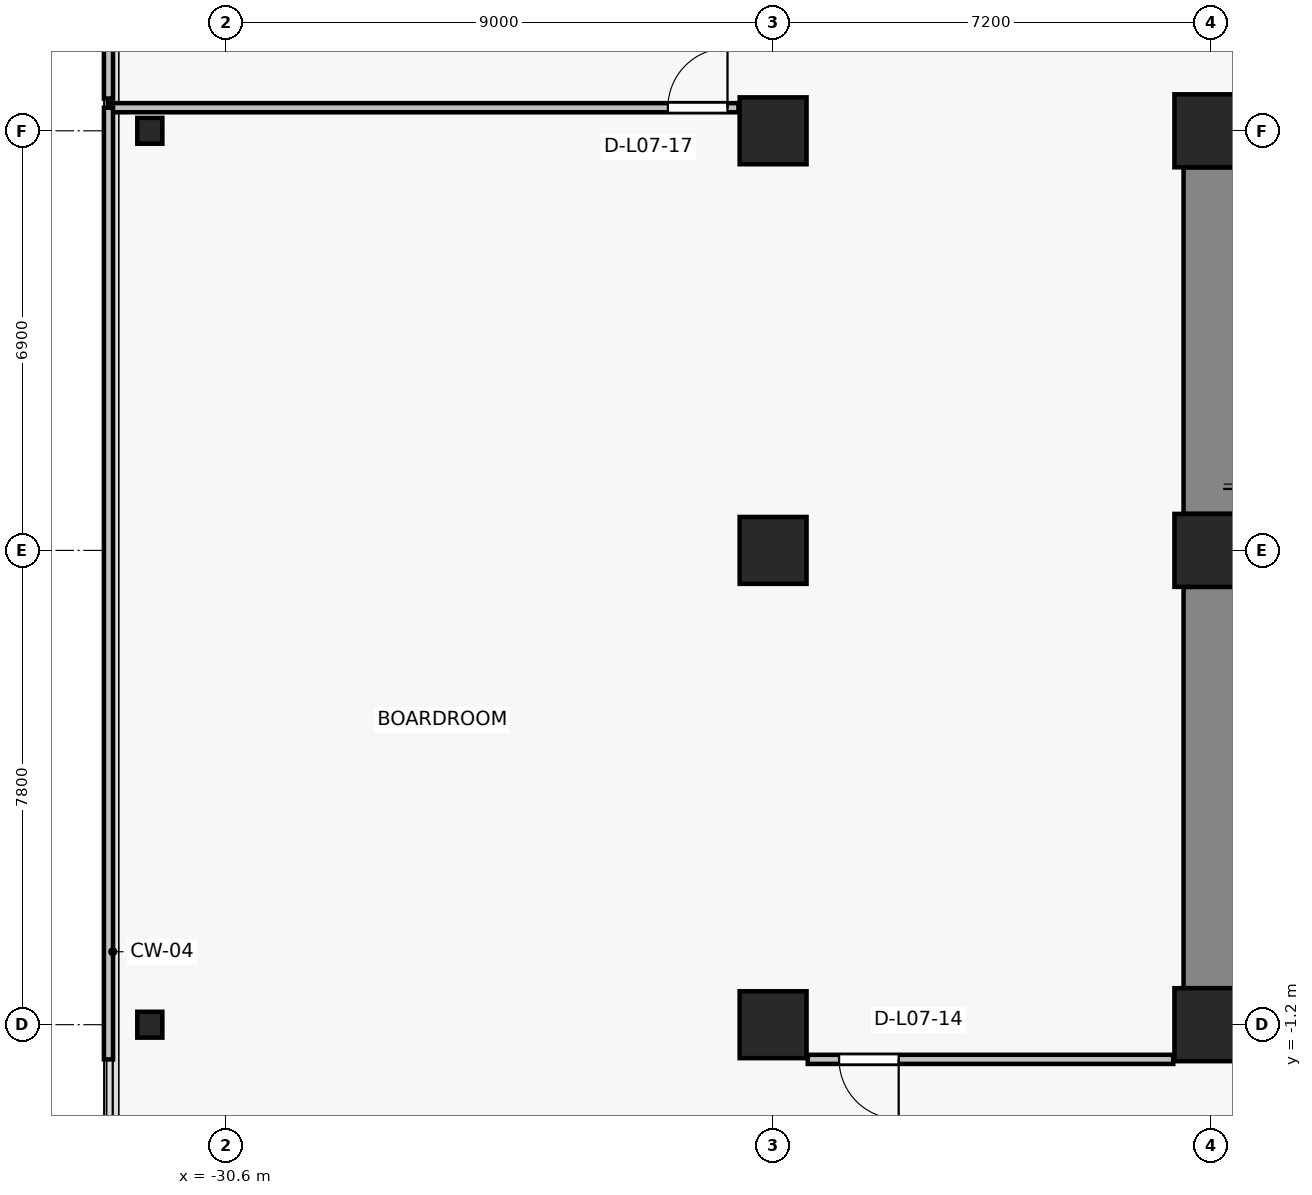
"""IFC4 building model, lengths in metres.
Left out: names, types, materials, properties, quantities, classifications, styles, units other than length and angle.
Written with IfcOpenShell. Run it as: python <this file> out.ifc"""

import sys

from ifc_helpers import new_model, si_unit, direction, frame, frame_2d, origin, origin_2d, place, context, subcontext, project, spatial, rectangle, i_section, extrude, source, transform, mapped, element, fill, save


model = new_model("IFC4")
c1 = context("Model", 3, precision=1e-05, world=origin(), true_north=direction((0.0, 1.0)))
c2 = subcontext(c1, "Body", "Model", "MODEL_VIEW")
j1 = project(units=[si_unit("LENGTHUNIT", "METRE"), si_unit("PLANEANGLEUNIT", "RADIAN")], contexts=[c1])
p1 = place(None, origin())
s1 = spatial("IfcSite", under=j1, at=p1, CompositionType="ELEMENT")
p2 = place(p1, origin())
s2 = spatial("IfcBuilding", under=s1, at=p2, CompositionType="ELEMENT")
p3 = place(p2, frame((0.0, 0.0, 30.7)))
s3 = spatial("IfcBuildingStorey", under=s2, at=p3, CompositionType="ELEMENT", Elevation=30.7)
for number, where, z_axis, x_axis in (
    (1, (-14.4, -1.2, 0.0), (0.0, 0.0, 1.0), (1.0, 0.0, 0.0)),
    (2, (-14.4, 6.6, 0.0), (0.0, 0.0, 1.0), (1.0, 0.0, 0.0)),
    (3, (-14.4, 13.5, 0.0), (0.0, 0.0, 1.0), (1.0, 0.0, 0.0)),
):
    element("IfcColumn", number, at=place(p3, frame(where, z_axis=z_axis, x_axis=x_axis)), inside=s3, PredefinedType="COLUMN", context=c2, shape_type="SweptSolid", body=[
        extrude(rectangle(XDim=1.2, YDim=1.2, at=origin_2d()), origin(), (0.0, 0.0, 1.0), 3.3),
    ])
for number, where, z_axis, x_axis in (
    (4, (-21.6, -1.2, 0.0), (0.0, 0.0, 1.0), (1.0, 0.0, 0.0)),
    (5, (-21.6, 6.6, 0.0), (0.0, 0.0, 1.0), (1.0, 0.0, 0.0)),
    (6, (-21.6, 13.5, 0.0), (0.0, 0.0, 1.0), (1.0, 0.0, 0.0)),
):
    element("IfcColumn", number, at=place(p3, frame(where, z_axis=z_axis, x_axis=x_axis)), inside=s3, PredefinedType="COLUMN", context=c2, shape_type="SweptSolid", body=[
        extrude(rectangle(XDim=1.1, YDim=1.1, at=origin_2d()), origin(), (0.0, 0.0, 1.0), 3.3),
    ])
for number, where, z_axis, x_axis in (
    (7, (-31.85, -1.2, 0.0), (0.0, 0.0, 1.0), (1.0, 0.0, 0.0)),
    (8, (-31.85, 13.5, 0.0), (0.0, 0.0, 1.0), (1.0, 0.0, 0.0)),
):
    element("IfcColumn", number, at=place(p3, frame(where, z_axis=z_axis, x_axis=x_axis)), inside=s3, PredefinedType="COLUMN", context=c2, shape_type="SweptSolid", body=[
        extrude(i_section(OverallWidth=0.412, OverallDepth=0.425, WebThickness=0.026, FlangeThickness=0.039, FilletRadius=0.015, at=origin_2d()), origin(), (0.0, 0.0, 1.0), 3.3),
    ])
p4 = place(p3, frame((-14.4, -0.6, 0.0), z_axis=(0.0, 0.0, 1.0), x_axis=(0.0, 1.0, 0.0)))
e9 = element("IfcWall", 9, at=p4, inside=s3, PredefinedType="SHEAR", context=c2, shape_type="SweptSolid", body=[
    extrude(rectangle(XDim=6.6, YDim=0.9, at=frame_2d((3.3, 0.0))), origin(), (0.0, 0.0, 1.0), 3.075),
])
p5 = place(p3, frame((-14.4, 7.2, 0.0), z_axis=(0.0, 0.0, 1.0), x_axis=(0.0, 1.0, 0.0)))
e10 = element("IfcWall", 10, at=p5, inside=s3, PredefinedType="SHEAR", context=c2, shape_type="SweptSolid", body=[
    extrude(rectangle(XDim=5.7, YDim=0.9, at=frame_2d((2.85, 0.0))), origin(), (0.0, 0.0, 1.0), 3.075),
])
p6 = place(p3, frame((-15.02, -1.77, 0.0), z_axis=(0.0, 0.0, 1.0), x_axis=(-1.0, 0.0, 0.0)))
e11 = element("IfcWall", 11, at=p6, inside=s3, PredefinedType="PARTITIONING", context=c2, shape_type="SweptSolid", body=[
    extrude(rectangle(XDim=6.01, YDim=0.15, at=frame_2d((3.005, 0.0))), origin(), (0.0, 0.0, 1.0), 3.075),
])
p7 = place(p6, frame((4.515, 0.0, 0.0)))
e12 = element("IfcOpeningElement", 12, at=p7, cuts=e11, PredefinedType="OPENING", context=c2, shape_type="SweptSolid", body=[
    extrude(rectangle(XDim=0.98, YDim=2.15, at=frame_2d((0.49, 1.075))), frame((0.0, 0.085, 0.0), z_axis=(0.0, -1.0, 0.0), x_axis=(1.0, 0.0, 0.0)), (0.0, 0.0, 1.0), 0.17),
])
p8 = place(p3, frame((-32.53, 13.88, 0.0), z_axis=(0.0, 0.0, 1.0), x_axis=(1.0, 0.0, 0.0)))
e13 = element("IfcWall", 13, at=p8, inside=s3, PredefinedType="PARTITIONING", context=c2, shape_type="SweptSolid", body=[
    extrude(rectangle(XDim=10.36, YDim=0.15, at=frame_2d((5.18, 0.0))), origin(), (0.0, 0.0, 1.0), 3.075),
])
p9 = place(p8, frame((9.2, 0.0, 0.0)))
e14 = element("IfcOpeningElement", 14, at=p9, cuts=e13, PredefinedType="OPENING", context=c2, shape_type="SweptSolid", body=[
    extrude(rectangle(XDim=0.98, YDim=2.15, at=frame_2d((0.49, 1.075))), frame((0.0, 0.085, 0.0), z_axis=(0.0, -1.0, 0.0), x_axis=(1.0, 0.0, 0.0)), (0.0, 0.0, 1.0), 0.17),
])
p10 = place(p3, frame((-32.53, -1.77, 0.0), z_axis=(0.0, 0.0, 1.0), x_axis=(0.0, 1.0, 0.0)))
e15 = element("IfcWall", 15, at=p10, inside=s3, PredefinedType="PARTITIONING", context=c2, shape_type="SweptSolid", body=[
    extrude(rectangle(XDim=15.65, YDim=0.15, at=frame_2d((7.825, 0.0))), origin(), (0.0, 0.0, 1.0), 3.075),
])
p11 = place(p3, frame((-32.53, 14.03, 0.0), z_axis=(0.0, 0.0, 1.0), x_axis=(0.0, 1.0, 0.0)))
e16 = element("IfcWall", 16, at=p11, inside=s3, PredefinedType="PARTITIONING", context=c2, shape_type="SweptSolid", body=[
    extrude(rectangle(XDim=4.1, YDim=0.15, at=frame_2d((2.05, 0.0))), origin(), (0.0, 0.0, 1.0), 3.075),
])
m1 = source(origin(), c2, "Body", "SweptSolid", [
    extrude(rectangle(XDim=0.98, YDim=2.15, at=frame_2d((0.49, 1.075))), frame((0.0, 0.025, 0.0), z_axis=(0.0, -1.0, 0.0), x_axis=(1.0, 0.0, 0.0)), (0.0, 0.0, 1.0), 0.05),
])
p12 = place(p7, origin())
e17 = element("IfcDoor", 17, at=p12, inside=s3, OperationType="SINGLE_SWING_LEFT", PredefinedType="DOOR", context=c2, shape_type="MappedRepresentation", body=[
    mapped(m1, transform((0.0, 0.0, 0.0), x_axis=(1.0, 0.0, 0.0), y_axis=(0.0, 1.0, 0.0), z_axis=(0.0, 0.0, 1.0), scale=1.0)),
])
fill(e12, e17)
p13 = place(p9, origin())
e18 = element("IfcDoor", 18, at=p13, inside=s3, OperationType="SINGLE_SWING_RIGHT", PredefinedType="DOOR", context=c2, shape_type="MappedRepresentation", body=[
    mapped(m1, transform((0.0, 0.0, 0.0), x_axis=(1.0, 0.0, 0.0), y_axis=(0.0, 1.0, 0.0), z_axis=(0.0, 0.0, 1.0), scale=1.0)),
])
fill(e14, e18)
save(model, sys.argv[1])
